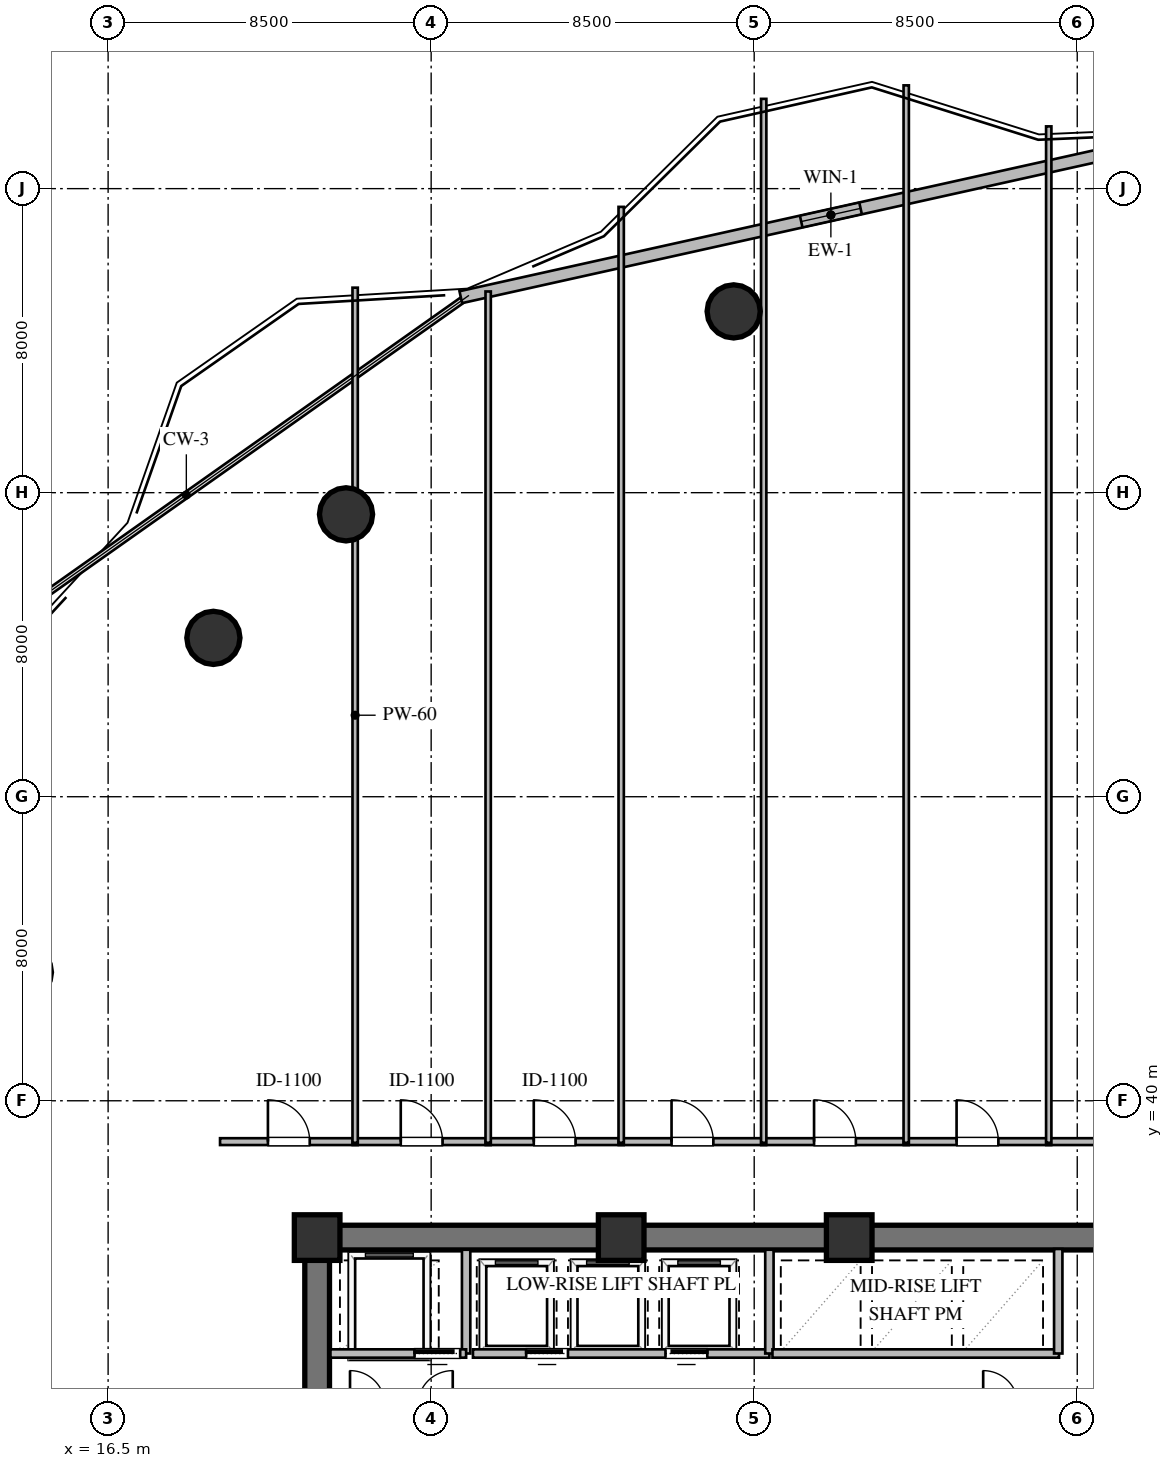
"""IFC4 building model, lengths in metres.
Left out: names, types, materials, properties, quantities, classifications, styles, units other than length and angle.
Written with IfcOpenShell. Run it as: python <this file> out.ifc"""

import sys

from ifc_helpers import new_model, si_unit, direction, frame, frame_2d, origin, origin_2d, place, context, subcontext, project, spatial, rectangle, circle, extrude, element, fill, save


model = new_model("IFC4")
c1 = context("Model", 3, precision=1e-05, world=origin(), true_north=direction((0.0, 1.0)))
c2 = subcontext(c1, "Body", "Model", "MODEL_VIEW")
j1 = project(units=[si_unit("LENGTHUNIT", "METRE"), si_unit("PLANEANGLEUNIT", "RADIAN")], contexts=[c1])
p1 = place(None, origin())
s1 = spatial("IfcSite", under=j1, at=p1, CompositionType="ELEMENT")
p2 = place(p1, origin())
s2 = spatial("IfcBuilding", under=s1, at=p2, CompositionType="ELEMENT")
p3 = place(p2, frame((0.0, 0.0, 56.4)))
s3 = spatial("IfcBuildingStorey", under=s2, at=p3, CompositionType="ELEMENT", Elevation=56.4)
p4 = place(p3, frame((21.675, 36.4, 0.0), z_axis=(0.0, 0.0, 1.0), x_axis=(1.0, 0.0, 0.0)))
e1 = element("IfcWall", 1, at=p4, inside=s3, PredefinedType="SHEAR", context=c2, shape_type="SweptSolid", body=[
    extrude(rectangle(XDim=22.65, YDim=0.65, at=frame_2d((11.325, 0.0))), origin(), (0.0, 0.0, 1.0), 3.36),
])
p5 = place(p3, frame((22.0, 23.925, 0.0), z_axis=(0.0, 0.0, 1.0), x_axis=(0.0, 1.0, 0.0)))
e2 = element("IfcWall", 2, at=p5, inside=s3, PredefinedType="SHEAR", context=c2, shape_type="SweptSolid", body=[
    extrude(rectangle(XDim=12.15, YDim=0.65, at=frame_2d((6.075, 0.0))), origin(), (0.0, 0.0, 1.0), 3.36),
])
for number, where, z_axis, x_axis in (
    (3, (36.0, 36.4, 0.0), (0.0, 0.0, 1.0), (1.0, 0.0, 0.0)),
    (4, (30.0, 36.4, 0.0), (0.0, 0.0, 1.0), (1.0, 0.0, 0.0)),
    (5, (22.0, 36.4, 0.0), (0.0, 0.0, 1.0), (1.0, 0.0, 0.0)),
):
    element("IfcColumn", number, at=place(p3, frame(where, z_axis=z_axis, x_axis=x_axis)), inside=s3, PredefinedType="COLUMN", context=c2, shape_type="SweptSolid", body=[
        extrude(rectangle(XDim=1.2, YDim=1.2, at=origin_2d()), origin(), (0.0, 0.0, 1.0), 3.6),
    ])
for number, where, z_axis, x_axis in (
    (6, (32.96, 60.77, 0.0), (0.0, 0.0, 1.0), (1.0, 0.0, 0.0)),
    (7, (22.76, 55.43, 0.0), (0.0, 0.0, 1.0), (1.0, 0.0, 0.0)),
    (8, (19.27, 52.18, 0.0), (0.0, 0.0, 1.0), (1.0, 0.0, 0.0)),
):
    element("IfcColumn", number, at=place(p3, frame(where, z_axis=z_axis, x_axis=x_axis)), inside=s3, PredefinedType="COLUMN", context=c2, shape_type="SweptSolid", body=[
        extrude(circle(Radius=0.7, at=origin_2d()), origin(), (0.0, 0.0, 1.0), 3.6),
    ])
p6 = place(p3, frame((25.78, 61.144, 0.0), z_axis=(0.0, 0.0, 1.0), x_axis=(0.976206349039, 0.216843639742, 0.0)))
e9 = element("IfcWall", 9, at=p6, inside=s3, PredefinedType="STANDARD", context=c2, shape_type="SweptSolid", body=[
    extrude(rectangle(XDim=19.949, YDim=0.32, at=frame_2d((9.975, 0.0))), origin(), (0.0, 0.0, 1.0), 3.36),
])
p7 = place(p6, frame((9.175, 0.0, 1.05)))
e10 = element("IfcOpeningElement", 10, at=p7, cuts=e9, PredefinedType="OPENING", context=c2, shape_type="SweptSolid", body=[
    extrude(rectangle(XDim=1.6, YDim=1.5, at=frame_2d((0.8, 0.75))), frame((0.0, 0.17, 0.0), z_axis=(0.0, -1.0, 0.0), x_axis=(1.0, 0.0, 0.0)), (0.0, 0.0, 1.0), 0.34),
])
p8 = place(p3, frame((25.92, 33.35, 0.0), z_axis=(0.0, 0.0, 1.0), x_axis=(0.0, 1.0, 0.0)))
e11 = element("IfcWall", 11, at=p8, inside=s3, PredefinedType="SOLIDWALL", context=c2, shape_type="SweptSolid", body=[
    extrude(rectangle(XDim=2.73, YDim=0.22, at=frame_2d((1.365, 0.0))), origin(), (0.0, 0.0, 1.0), 3.36),
])
p9 = place(p3, frame((22.35, 33.35, 0.0), z_axis=(0.0, 0.0, 1.0), x_axis=(1.0, 0.0, 0.0)))
e12 = element("IfcWall", 12, at=p9, inside=s3, PredefinedType="SOLIDWALL", context=c2, shape_type="SweptSolid", body=[
    extrude(rectangle(XDim=3.57, YDim=0.22, at=frame_2d((1.785, 0.0))), origin(), (0.0, 0.0, 1.0), 3.36),
])
p10 = place(p9, frame((2.213, 0.0, 0.0)))
e13 = element("IfcOpeningElement", 13, at=p10, cuts=e12, PredefinedType="OPENING", context=c2, shape_type="SweptSolid", body=[
    extrude(rectangle(XDim=1.2, YDim=2.1, at=frame_2d((0.6, 1.05))), frame((0.0, 0.12, 0.0), z_axis=(0.0, -1.0, 0.0), x_axis=(1.0, 0.0, 0.0)), (0.0, 0.0, 1.0), 0.24),
])
p11 = place(p3, frame((26.1, 33.35, 0.0), z_axis=(0.0, 0.0, 1.0), x_axis=(1.0, 0.0, 0.0)))
e14 = element("IfcWall", 14, at=p11, inside=s3, PredefinedType="SOLIDWALL", context=c2, shape_type="SweptSolid", body=[
    extrude(rectangle(XDim=7.8, YDim=0.22, at=frame_2d((3.9, 0.0))), origin(), (0.0, 0.0, 1.0), 3.36),
])
p12 = place(p11, frame((1.4, 0.0, 0.0)))
e15 = element("IfcOpeningElement", 15, at=p12, cuts=e14, PredefinedType="OPENING", context=c2, shape_type="SweptSolid", body=[
    extrude(rectangle(XDim=1.1, YDim=2.1, at=frame_2d((0.55, 1.05))), frame((0.0, 0.12, 0.0), z_axis=(0.0, -1.0, 0.0), x_axis=(1.0, 0.0, 0.0)), (0.0, 0.0, 1.0), 0.24),
])
p13 = place(p11, frame((5.066, 0.0, 0.0)))
e16 = element("IfcOpeningElement", 16, at=p13, cuts=e14, PredefinedType="OPENING", context=c2, shape_type="SweptSolid", body=[
    extrude(rectangle(XDim=1.1, YDim=2.1, at=frame_2d((0.55, 1.05))), frame((0.0, 0.12, 0.0), z_axis=(0.0, -1.0, 0.0), x_axis=(1.0, 0.0, 0.0)), (0.0, 0.0, 1.0), 0.24),
])
p14 = place(p3, frame((33.9, 33.35, 0.0), z_axis=(0.0, 0.0, 1.0), x_axis=(0.0, 1.0, 0.0)))
e17 = element("IfcWall", 17, at=p14, inside=s3, PredefinedType="SOLIDWALL", context=c2, shape_type="SweptSolid", body=[
    extrude(rectangle(XDim=2.73, YDim=0.22, at=frame_2d((1.365, 0.0))), origin(), (0.0, 0.0, 1.0), 3.36),
])
p15 = place(p3, frame((33.98, 33.35, 0.0), z_axis=(0.0, 0.0, 1.0), x_axis=(1.0, 0.0, 0.0)))
e18 = element("IfcWall", 18, at=p15, inside=s3, PredefinedType="SOLIDWALL", context=c2, shape_type="SweptSolid", body=[
    extrude(rectangle(XDim=7.54, YDim=0.22, at=frame_2d((3.77, 0.0))), origin(), (0.0, 0.0, 1.0), 3.36),
])
p16 = place(p3, frame((41.5, 33.35, 0.0), z_axis=(0.0, 0.0, 1.0), x_axis=(0.0, 1.0, 0.0)))
e19 = element("IfcWall", 19, at=p16, inside=s3, PredefinedType="SOLIDWALL", context=c2, shape_type="SweptSolid", body=[
    extrude(rectangle(XDim=2.75, YDim=0.22, at=frame_2d((1.375, 0.0))), origin(), (0.0, 0.0, 1.0), 3.36),
])
p17 = place(p3, frame((19.445, 38.925, 0.0), z_axis=(0.0, 0.0, 1.0), x_axis=(1.0, 0.0, 0.0)))
e20 = element("IfcWall", 20, at=p17, inside=s3, PredefinedType="PARTITIONING", context=c2, shape_type="SweptSolid", body=[
    extrude(rectangle(XDim=3.62, YDim=0.18, at=frame_2d((1.81, 0.0))), origin(), (0.0, 0.0, 1.0), 3.36),
])
p18 = place(p17, frame((1.26, 0.0, 0.0)))
e21 = element("IfcOpeningElement", 21, at=p18, cuts=e20, PredefinedType="OPENING", context=c2, shape_type="SweptSolid", body=[
    extrude(rectangle(XDim=1.1, YDim=2.1, at=frame_2d((0.55, 1.05))), frame((0.0, 0.1, 0.0), z_axis=(0.0, -1.0, 0.0), x_axis=(1.0, 0.0, 0.0)), (0.0, 0.0, 1.0), 0.2),
])
p19 = place(p3, frame((22.935, 38.925, 0.0), z_axis=(0.0, 0.0, 1.0), x_axis=(1.0, 0.0, 0.0)))
e22 = element("IfcWall", 22, at=p19, inside=s3, PredefinedType="PARTITIONING", context=c2, shape_type="SweptSolid", body=[
    extrude(rectangle(XDim=3.63, YDim=0.18, at=frame_2d((1.815, 0.0))), origin(), (0.0, 0.0, 1.0), 3.36),
])
p20 = place(p19, frame((1.265, 0.0, 0.0)))
e23 = element("IfcOpeningElement", 23, at=p20, cuts=e22, PredefinedType="OPENING", context=c2, shape_type="SweptSolid", body=[
    extrude(rectangle(XDim=1.1, YDim=2.1, at=frame_2d((0.55, 1.05))), frame((0.0, 0.1, 0.0), z_axis=(0.0, -1.0, 0.0), x_axis=(1.0, 0.0, 0.0)), (0.0, 0.0, 1.0), 0.2),
])
p21 = place(p3, frame((26.435, 38.925, 0.0), z_axis=(0.0, 0.0, 1.0), x_axis=(1.0, 0.0, 0.0)))
e24 = element("IfcWall", 24, at=p21, inside=s3, PredefinedType="PARTITIONING", context=c2, shape_type="SweptSolid", body=[
    extrude(rectangle(XDim=3.63, YDim=0.18, at=frame_2d((1.815, 0.0))), origin(), (0.0, 0.0, 1.0), 3.36),
])
p22 = place(p21, frame((1.265, 0.0, 0.0)))
e25 = element("IfcOpeningElement", 25, at=p22, cuts=e24, PredefinedType="OPENING", context=c2, shape_type="SweptSolid", body=[
    extrude(rectangle(XDim=1.1, YDim=2.1, at=frame_2d((0.55, 1.05))), frame((0.0, 0.1, 0.0), z_axis=(0.0, -1.0, 0.0), x_axis=(1.0, 0.0, 0.0)), (0.0, 0.0, 1.0), 0.2),
])
p23 = place(p3, frame((29.935, 38.925, 0.0), z_axis=(0.0, 0.0, 1.0), x_axis=(1.0, 0.0, 0.0)))
e26 = element("IfcWall", 26, at=p23, inside=s3, PredefinedType="PARTITIONING", context=c2, shape_type="SweptSolid", body=[
    extrude(rectangle(XDim=3.88, YDim=0.18, at=frame_2d((1.94, 0.0))), origin(), (0.0, 0.0, 1.0), 3.36),
])
p24 = place(p23, frame((1.39, 0.0, 0.0)))
e27 = element("IfcOpeningElement", 27, at=p24, cuts=e26, PredefinedType="OPENING", context=c2, shape_type="SweptSolid", body=[
    extrude(rectangle(XDim=1.1, YDim=2.1, at=frame_2d((0.55, 1.05))), frame((0.0, 0.1, 0.0), z_axis=(0.0, -1.0, 0.0), x_axis=(1.0, 0.0, 0.0)), (0.0, 0.0, 1.0), 0.2),
])
p25 = place(p3, frame((33.685, 38.925, 0.0), z_axis=(0.0, 0.0, 1.0), x_axis=(1.0, 0.0, 0.0)))
e28 = element("IfcWall", 28, at=p25, inside=s3, PredefinedType="PARTITIONING", context=c2, shape_type="SweptSolid", body=[
    extrude(rectangle(XDim=3.88, YDim=0.18, at=frame_2d((1.94, 0.0))), origin(), (0.0, 0.0, 1.0), 3.36),
])
p26 = place(p25, frame((1.39, 0.0, 0.0)))
e29 = element("IfcOpeningElement", 29, at=p26, cuts=e28, PredefinedType="OPENING", context=c2, shape_type="SweptSolid", body=[
    extrude(rectangle(XDim=1.1, YDim=2.1, at=frame_2d((0.55, 1.05))), frame((0.0, 0.1, 0.0), z_axis=(0.0, -1.0, 0.0), x_axis=(1.0, 0.0, 0.0)), (0.0, 0.0, 1.0), 0.2),
])
p27 = place(p3, frame((37.435, 38.925, 0.0), z_axis=(0.0, 0.0, 1.0), x_axis=(1.0, 0.0, 0.0)))
e30 = element("IfcWall", 30, at=p27, inside=s3, PredefinedType="PARTITIONING", context=c2, shape_type="SweptSolid", body=[
    extrude(rectangle(XDim=3.88, YDim=0.18, at=frame_2d((1.94, 0.0))), origin(), (0.0, 0.0, 1.0), 3.36),
])
p28 = place(p27, frame((1.39, 0.0, 0.0)))
e31 = element("IfcOpeningElement", 31, at=p28, cuts=e30, PredefinedType="OPENING", context=c2, shape_type="SweptSolid", body=[
    extrude(rectangle(XDim=1.1, YDim=2.1, at=frame_2d((0.55, 1.05))), frame((0.0, 0.1, 0.0), z_axis=(0.0, -1.0, 0.0), x_axis=(1.0, 0.0, 0.0)), (0.0, 0.0, 1.0), 0.2),
])
p29 = place(p3, frame((41.185, 38.925, 0.0), z_axis=(0.0, 0.0, 1.0), x_axis=(1.0, 0.0, 0.0)))
e32 = element("IfcWall", 32, at=p29, inside=s3, PredefinedType="PARTITIONING", context=c2, shape_type="SweptSolid", body=[
    extrude(rectangle(XDim=5.37, YDim=0.18, at=frame_2d((2.685, 0.0))), origin(), (0.0, 0.0, 1.0), 3.36),
])
p30 = place(p29, frame((2.135, 0.0, 0.0)))
e33 = element("IfcOpeningElement", 33, at=p30, cuts=e32, PredefinedType="OPENING", context=c2, shape_type="SweptSolid", body=[
    extrude(rectangle(XDim=1.1, YDim=2.1, at=frame_2d((0.55, 1.05))), frame((0.0, 0.1, 0.0), z_axis=(0.0, -1.0, 0.0), x_axis=(1.0, 0.0, 0.0)), (0.0, 0.0, 1.0), 0.2),
])
p31 = place(p3, frame((23.0, 61.394, 0.0), z_axis=(0.0, 0.0, 1.0), x_axis=(0.0, -1.0, 0.0)))
e34 = element("IfcWall", 34, at=p31, inside=s3, PredefinedType="PARTITIONING", context=c2, shape_type="SweptSolid", body=[
    extrude(rectangle(XDim=22.499, YDim=0.14, at=frame_2d((11.25, 0.0))), origin(), (0.0, 0.0, 1.0), 2.806),
])
p32 = place(p3, frame((26.5, 61.294, 0.0), z_axis=(0.0, 0.0, 1.0), x_axis=(0.0, -1.0, 0.0)))
e35 = element("IfcWall", 35, at=p32, inside=s3, PredefinedType="PARTITIONING", context=c2, shape_type="SweptSolid", body=[
    extrude(rectangle(XDim=22.399, YDim=0.14, at=frame_2d((11.199, 0.0))), origin(), (0.0, 0.0, 1.0), 3.36),
])
p33 = place(p3, frame((30.0, 63.52, 0.0), z_axis=(0.0, 0.0, 1.0), x_axis=(0.0, -1.0, 0.0)))
e36 = element("IfcWall", 36, at=p33, inside=s3, PredefinedType="PARTITIONING", context=c2, shape_type="SweptSolid", body=[
    extrude(rectangle(XDim=24.625, YDim=0.14, at=frame_2d((12.312, 0.0))), origin(), (0.0, 0.0, 1.0), 2.806),
])
p34 = place(p3, frame((33.75, 66.362, 0.0), z_axis=(0.0, 0.0, 1.0), x_axis=(0.0, -1.0, 0.0)))
e37 = element("IfcWall", 37, at=p34, inside=s3, PredefinedType="PARTITIONING", context=c2, shape_type="SweptSolid", body=[
    extrude(rectangle(XDim=27.467, YDim=0.14, at=frame_2d((13.733, 0.0))), origin(), (0.0, 0.0, 1.0), 3.36),
])
p35 = place(p3, frame((37.5, 66.717, 0.0), z_axis=(0.0, 0.0, 1.0), x_axis=(0.0, -1.0, 0.0)))
e38 = element("IfcWall", 38, at=p35, inside=s3, PredefinedType="PARTITIONING", context=c2, shape_type="SweptSolid", body=[
    extrude(rectangle(XDim=27.822, YDim=0.14, at=frame_2d((13.911, 0.0))), origin(), (0.0, 0.0, 1.0), 3.36),
])
p36 = place(p3, frame((41.25, 65.638, 0.0), z_axis=(0.0, 0.0, 1.0), x_axis=(0.0, -1.0, 0.0)))
e39 = element("IfcWall", 39, at=p36, inside=s3, PredefinedType="PARTITIONING", context=c2, shape_type="SweptSolid", body=[
    extrude(rectangle(XDim=26.743, YDim=0.14, at=frame_2d((13.372, 0.0))), origin(), (0.0, 0.0, 1.0), 3.36),
])
p37 = place(p7, origin())
e40 = element("IfcWindow", 40, at=p37, inside=s3, PartitioningType="SINGLE_PANEL", PredefinedType="WINDOW", context=c2, shape_type="SweptSolid", body=[
    extrude(rectangle(XDim=1.6, YDim=1.5, at=frame_2d((0.8, 0.75))), frame((0.0, 0.03, 0.0), z_axis=(0.0, -1.0, 0.0), x_axis=(1.0, 0.0, 0.0)), (0.0, 0.0, 1.0), 0.06),
])
fill(e10, e40)
p38 = place(p10, origin())
e41 = element("IfcDoor", 41, at=p38, inside=s3, OperationType="SLIDING_TO_LEFT", PredefinedType="DOOR", context=c2, shape_type="SweptSolid", body=[
    extrude(rectangle(XDim=1.2, YDim=2.1, at=frame_2d((0.6, 1.05))), frame((0.0, 0.025, 0.0), z_axis=(0.0, -1.0, 0.0), x_axis=(1.0, 0.0, 0.0)), (0.0, 0.0, 1.0), 0.05),
])
fill(e13, e41)
p39 = place(p12, origin())
e42 = element("IfcDoor", 42, at=p39, inside=s3, OperationType="SLIDING_TO_LEFT", PredefinedType="DOOR", context=c2, shape_type="SweptSolid", body=[
    extrude(rectangle(XDim=1.1, YDim=2.1, at=frame_2d((0.55, 1.05))), frame((0.0, 0.025, 0.0), z_axis=(0.0, -1.0, 0.0), x_axis=(1.0, 0.0, 0.0)), (0.0, 0.0, 1.0), 0.05),
])
fill(e15, e42)
p40 = place(p13, origin())
e43 = element("IfcDoor", 43, at=p40, inside=s3, OperationType="SLIDING_TO_RIGHT", PredefinedType="DOOR", context=c2, shape_type="SweptSolid", body=[
    extrude(rectangle(XDim=1.1, YDim=2.1, at=frame_2d((0.55, 1.05))), frame((0.0, 0.025, 0.0), z_axis=(0.0, -1.0, 0.0), x_axis=(1.0, 0.0, 0.0)), (0.0, 0.0, 1.0), 0.05),
])
fill(e16, e43)
p41 = place(p18, origin())
e44 = element("IfcDoor", 44, at=p41, inside=s3, OperationType="SINGLE_SWING_LEFT", PredefinedType="DOOR", context=c2, shape_type="SweptSolid", body=[
    extrude(rectangle(XDim=1.1, YDim=2.1, at=frame_2d((0.55, 1.05))), frame((0.0, 0.025, 0.0), z_axis=(0.0, -1.0, 0.0), x_axis=(1.0, 0.0, 0.0)), (0.0, 0.0, 1.0), 0.05),
])
fill(e21, e44)
p42 = place(p20, origin())
e45 = element("IfcDoor", 45, at=p42, inside=s3, OperationType="SINGLE_SWING_LEFT", PredefinedType="DOOR", context=c2, shape_type="SweptSolid", body=[
    extrude(rectangle(XDim=1.1, YDim=2.1, at=frame_2d((0.55, 1.05))), frame((0.0, 0.025, 0.0), z_axis=(0.0, -1.0, 0.0), x_axis=(1.0, 0.0, 0.0)), (0.0, 0.0, 1.0), 0.05),
])
fill(e23, e45)
p43 = place(p22, origin())
e46 = element("IfcDoor", 46, at=p43, inside=s3, OperationType="SINGLE_SWING_LEFT", PredefinedType="DOOR", context=c2, shape_type="SweptSolid", body=[
    extrude(rectangle(XDim=1.1, YDim=2.1, at=frame_2d((0.55, 1.05))), frame((0.0, 0.025, 0.0), z_axis=(0.0, -1.0, 0.0), x_axis=(1.0, 0.0, 0.0)), (0.0, 0.0, 1.0), 0.05),
])
fill(e25, e46)
p44 = place(p24, origin())
e47 = element("IfcDoor", 47, at=p44, inside=s3, OperationType="SINGLE_SWING_LEFT", PredefinedType="DOOR", context=c2, shape_type="SweptSolid", body=[
    extrude(rectangle(XDim=1.1, YDim=2.1, at=frame_2d((0.55, 1.05))), frame((0.0, 0.025, 0.0), z_axis=(0.0, -1.0, 0.0), x_axis=(1.0, 0.0, 0.0)), (0.0, 0.0, 1.0), 0.05),
])
fill(e27, e47)
p45 = place(p26, origin())
e48 = element("IfcDoor", 48, at=p45, inside=s3, OperationType="SINGLE_SWING_LEFT", PredefinedType="DOOR", context=c2, shape_type="SweptSolid", body=[
    extrude(rectangle(XDim=1.1, YDim=2.1, at=frame_2d((0.55, 1.05))), frame((0.0, 0.025, 0.0), z_axis=(0.0, -1.0, 0.0), x_axis=(1.0, 0.0, 0.0)), (0.0, 0.0, 1.0), 0.05),
])
fill(e29, e48)
p46 = place(p28, origin())
e49 = element("IfcDoor", 49, at=p46, inside=s3, OperationType="SINGLE_SWING_LEFT", PredefinedType="DOOR", context=c2, shape_type="SweptSolid", body=[
    extrude(rectangle(XDim=1.1, YDim=2.1, at=frame_2d((0.55, 1.05))), frame((0.0, 0.025, 0.0), z_axis=(0.0, -1.0, 0.0), x_axis=(1.0, 0.0, 0.0)), (0.0, 0.0, 1.0), 0.05),
])
fill(e31, e49)
save(model, sys.argv[1])
